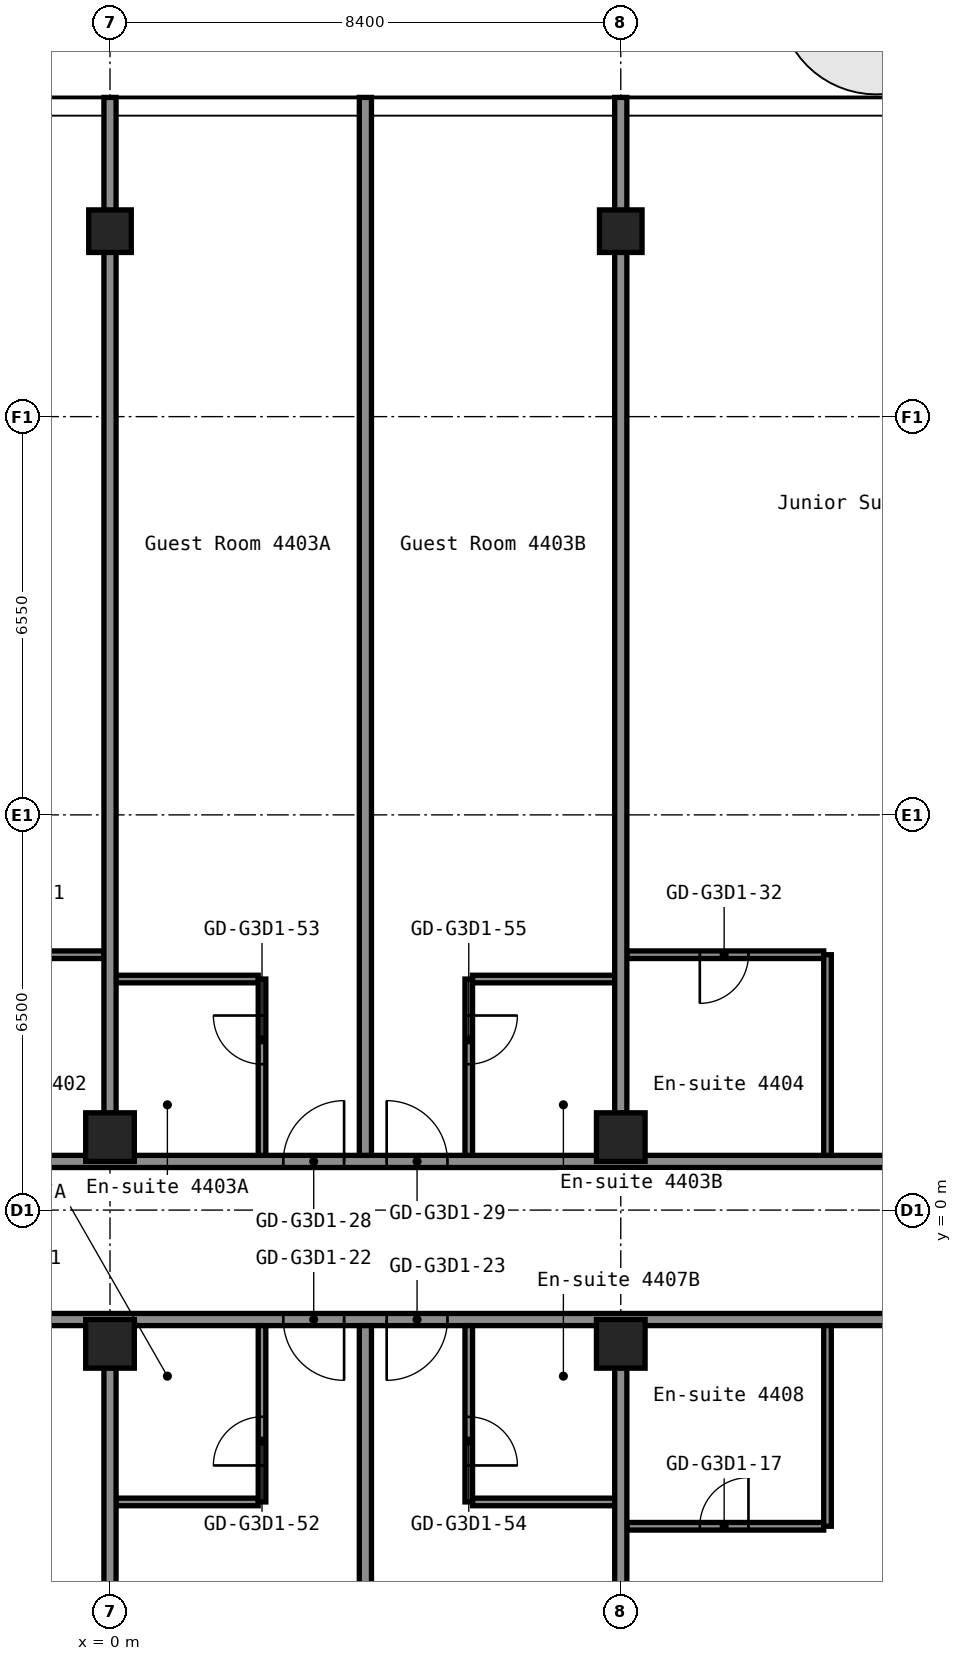
"""IFC4 building model, lengths in metres.
Left out: names, types, materials, properties, quantities, classifications, styles, units other than length and angle.
Written with IfcOpenShell. Run it as: python <this file> out.ifc"""

import sys

from ifc_helpers import new_model, si_unit, direction, frame, frame_2d, origin, origin_2d, place, context, subcontext, project, spatial, rectangle, hollow_rectangle, extrude, element, fill, save


model = new_model("IFC4")
c1 = context("Model", 3, precision=1e-05, world=origin(), true_north=direction((0.0, 1.0)))
c2 = subcontext(c1, "Body", "Model", "MODEL_VIEW")
j1 = project(units=[si_unit("LENGTHUNIT", "METRE"), si_unit("PLANEANGLEUNIT", "RADIAN")], contexts=[c1])
p1 = place(None, origin())
s1 = spatial("IfcSite", under=j1, at=p1, CompositionType="ELEMENT")
p2 = place(p1, origin())
s2 = spatial("IfcBuilding", under=s1, at=p2, CompositionType="ELEMENT")
p3 = place(p2, frame((0.0, 0.0, 156.6)))
s3 = spatial("IfcBuildingStorey", under=s2, at=p3, CompositionType="ELEMENT", Elevation=156.6)
for number, where, z_axis, x_axis in (
    (1, (0.0, -2.2, 0.0), (0.0, 0.0, 1.0), (1.0, 0.0, 0.0)),
    (2, (0.0, 1.2, 0.0), (0.0, 0.0, 1.0), (1.0, 0.0, 0.0)),
):
    element("IfcColumn", number, at=place(p3, frame(where, z_axis=z_axis, x_axis=x_axis)), inside=s3, PredefinedType="COLUMN", context=c2, shape_type="SweptSolid", body=[
        extrude(hollow_rectangle(XDim=0.8, YDim=0.8, WallThickness=0.032, at=origin_2d()), origin(), (0.0, 0.0, 1.0), 2.75),
    ])
p4 = place(p3, frame((0.0, 16.1, 0.0), z_axis=(0.0, 0.0, 1.0), x_axis=(1.0, 0.0, 0.0)))
e3 = element("IfcColumn", 3, at=p4, inside=s3, PredefinedType="COLUMN", context=c2, shape_type="SweptSolid", body=[
    extrude(hollow_rectangle(XDim=0.7, YDim=0.7, WallThickness=0.028, at=origin_2d()), origin(), (0.0, 0.0, 1.0), 2.75),
])
for number, where, z_axis, x_axis in (
    (4, (8.4, -2.2, 0.0), (0.0, 0.0, 1.0), (1.0, 0.0, 0.0)),
    (5, (8.4, 1.2, 0.0), (0.0, 0.0, 1.0), (1.0, 0.0, 0.0)),
):
    element("IfcColumn", number, at=place(p3, frame(where, z_axis=z_axis, x_axis=x_axis)), inside=s3, PredefinedType="COLUMN", context=c2, shape_type="SweptSolid", body=[
        extrude(hollow_rectangle(XDim=0.8, YDim=0.8, WallThickness=0.032, at=origin_2d()), origin(), (0.0, 0.0, 1.0), 2.75),
    ])
p5 = place(p3, frame((8.4, 16.1, 0.0), z_axis=(0.0, 0.0, 1.0), x_axis=(1.0, 0.0, 0.0)))
e6 = element("IfcColumn", 6, at=p5, inside=s3, PredefinedType="COLUMN", context=c2, shape_type="SweptSolid", body=[
    extrude(hollow_rectangle(XDim=0.7, YDim=0.7, WallThickness=0.028, at=origin_2d()), origin(), (0.0, 0.0, 1.0), 2.75),
])
p6 = place(p3, frame((8.5, -5.2, 0.0), z_axis=(0.0, 0.0, 1.0), x_axis=(1.0, 0.0, 0.0)))
e7 = element("IfcWall", 7, at=p6, inside=s3, PredefinedType="PARTITIONING", context=c2, shape_type="SweptSolid", body=[
    extrude(rectangle(XDim=3.238, YDim=0.125, at=frame_2d((1.619, 0.0))), origin(), (0.0, 0.0, 1.0), 2.75),
])
p7 = place(p6, frame((1.2, 0.0, 0.0)))
e8 = element("IfcOpeningElement", 8, at=p7, cuts=e7, PredefinedType="OPENING", context=c2, shape_type="SweptSolid", body=[
    extrude(rectangle(XDim=0.8, YDim=2.1, at=frame_2d((0.4, 1.05))), frame((0.0, 0.073, 0.0), z_axis=(0.0, -1.0, 0.0), x_axis=(1.0, 0.0, 0.0)), (0.0, 0.0, 1.0), 0.145),
])
p8 = place(p3, frame((0.1, -4.8, 0.0), z_axis=(0.0, 0.0, 1.0), x_axis=(1.0, 0.0, 0.0)))
e9 = element("IfcWall", 9, at=p8, inside=s3, PredefinedType="PARTITIONING", context=c2, shape_type="SweptSolid", body=[
    extrude(rectangle(XDim=2.337, YDim=0.125, at=frame_2d((1.169, 0.0))), origin(), (0.0, 0.0, 1.0), 2.75),
])
p9 = place(p3, frame((5.962, -4.8, 0.0), z_axis=(0.0, 0.0, 1.0), x_axis=(1.0, 0.0, 0.0)))
e10 = element("IfcWall", 10, at=p9, inside=s3, PredefinedType="PARTITIONING", context=c2, shape_type="SweptSolid", body=[
    extrude(rectangle(XDim=2.338, YDim=0.125, at=frame_2d((1.169, 0.0))), origin(), (0.0, 0.0, 1.0), 2.75),
])
p10 = place(p3, frame((-16.8, -1.8, 0.0), z_axis=(0.0, 0.0, 1.0), x_axis=(1.0, 0.0, 0.0)))
e11 = element("IfcWall", 11, at=p10, inside=s3, PredefinedType="PARTITIONING", context=c2, shape_type="SweptSolid", body=[
    extrude(rectangle(XDim=33.6, YDim=0.2, at=frame_2d((16.8, 0.0))), origin(), (0.0, 0.0, 1.0), 2.75),
])
p11 = place(p10, frame((2.85, 0.0, 0.0)))
e12 = element("IfcOpeningElement", 12, at=p11, cuts=e11, PredefinedType="OPENING", context=c2, shape_type="SweptSolid", body=[
    extrude(rectangle(XDim=1.0, YDim=2.1, at=frame_2d((0.5, 1.05))), frame((0.0, 0.11, 0.0), z_axis=(0.0, -1.0, 0.0), x_axis=(1.0, 0.0, 0.0)), (0.0, 0.0, 1.0), 0.22),
])
p12 = place(p10, frame((4.55, 0.0, 0.0)))
e13 = element("IfcOpeningElement", 13, at=p12, cuts=e11, PredefinedType="OPENING", context=c2, shape_type="SweptSolid", body=[
    extrude(rectangle(XDim=1.0, YDim=2.1, at=frame_2d((0.5, 1.05))), frame((0.0, 0.11, 0.0), z_axis=(0.0, -1.0, 0.0), x_axis=(1.0, 0.0, 0.0)), (0.0, 0.0, 1.0), 0.22),
])
p13 = place(p10, frame((10.385, 0.0, 0.0)))
e14 = element("IfcOpeningElement", 14, at=p13, cuts=e11, PredefinedType="OPENING", context=c2, shape_type="SweptSolid", body=[
    extrude(rectangle(XDim=0.9, YDim=2.1, at=frame_2d((0.45, 1.05))), frame((0.0, 0.11, 0.0), z_axis=(0.0, -1.0, 0.0), x_axis=(1.0, 0.0, 0.0)), (0.0, 0.0, 1.0), 0.22),
])
p14 = place(p10, frame((14.585, 0.0, 0.0)))
e15 = element("IfcOpeningElement", 15, at=p14, cuts=e11, PredefinedType="OPENING", context=c2, shape_type="SweptSolid", body=[
    extrude(rectangle(XDim=0.9, YDim=2.1, at=frame_2d((0.45, 1.05))), frame((0.0, 0.11, 0.0), z_axis=(0.0, -1.0, 0.0), x_axis=(1.0, 0.0, 0.0)), (0.0, 0.0, 1.0), 0.22),
])
p15 = place(p10, frame((19.65, 0.0, 0.0)))
e16 = element("IfcOpeningElement", 16, at=p15, cuts=e11, PredefinedType="OPENING", context=c2, shape_type="SweptSolid", body=[
    extrude(rectangle(XDim=1.0, YDim=2.1, at=frame_2d((0.5, 1.05))), frame((0.0, 0.11, 0.0), z_axis=(0.0, -1.0, 0.0), x_axis=(1.0, 0.0, 0.0)), (0.0, 0.0, 1.0), 0.22),
])
p16 = place(p10, frame((21.35, 0.0, 0.0)))
e17 = element("IfcOpeningElement", 17, at=p16, cuts=e11, PredefinedType="OPENING", context=c2, shape_type="SweptSolid", body=[
    extrude(rectangle(XDim=1.0, YDim=2.1, at=frame_2d((0.5, 1.05))), frame((0.0, 0.11, 0.0), z_axis=(0.0, -1.0, 0.0), x_axis=(1.0, 0.0, 0.0)), (0.0, 0.0, 1.0), 0.22),
])
p17 = place(p10, frame((30.6, 0.0, 0.0)))
e18 = element("IfcOpeningElement", 18, at=p17, cuts=e11, PredefinedType="OPENING", context=c2, shape_type="SweptSolid", body=[
    extrude(rectangle(XDim=1.0, YDim=2.1, at=frame_2d((0.5, 1.05))), frame((0.0, 0.11, 0.0), z_axis=(0.0, -1.0, 0.0), x_axis=(1.0, 0.0, 0.0)), (0.0, 0.0, 1.0), 0.22),
])
p18 = place(p3, frame((-16.8, 0.8, 0.0), z_axis=(0.0, 0.0, 1.0), x_axis=(1.0, 0.0, 0.0)))
e19 = element("IfcWall", 19, at=p18, inside=s3, PredefinedType="PARTITIONING", context=c2, shape_type="SweptSolid", body=[
    extrude(rectangle(XDim=33.6, YDim=0.2, at=frame_2d((16.8, 0.0))), origin(), (0.0, 0.0, 1.0), 2.75),
])
p19 = place(p18, frame((2.85, 0.0, 0.0)))
e20 = element("IfcOpeningElement", 20, at=p19, cuts=e19, PredefinedType="OPENING", context=c2, shape_type="SweptSolid", body=[
    extrude(rectangle(XDim=1.0, YDim=2.1, at=frame_2d((0.5, 1.05))), frame((0.0, 0.11, 0.0), z_axis=(0.0, -1.0, 0.0), x_axis=(1.0, 0.0, 0.0)), (0.0, 0.0, 1.0), 0.22),
])
p20 = place(p18, frame((4.55, 0.0, 0.0)))
e21 = element("IfcOpeningElement", 21, at=p20, cuts=e19, PredefinedType="OPENING", context=c2, shape_type="SweptSolid", body=[
    extrude(rectangle(XDim=1.0, YDim=2.1, at=frame_2d((0.5, 1.05))), frame((0.0, 0.11, 0.0), z_axis=(0.0, -1.0, 0.0), x_axis=(1.0, 0.0, 0.0)), (0.0, 0.0, 1.0), 0.22),
])
p21 = place(p18, frame((10.4, 0.0, 0.0)))
e22 = element("IfcOpeningElement", 22, at=p21, cuts=e19, PredefinedType="OPENING", context=c2, shape_type="SweptSolid", body=[
    extrude(rectangle(XDim=1.0, YDim=2.1, at=frame_2d((0.5, 1.05))), frame((0.0, 0.11, 0.0), z_axis=(0.0, -1.0, 0.0), x_axis=(1.0, 0.0, 0.0)), (0.0, 0.0, 1.0), 0.22),
])
p22 = place(p18, frame((19.65, 0.0, 0.0)))
e23 = element("IfcOpeningElement", 23, at=p22, cuts=e19, PredefinedType="OPENING", context=c2, shape_type="SweptSolid", body=[
    extrude(rectangle(XDim=1.0, YDim=2.1, at=frame_2d((0.5, 1.05))), frame((0.0, 0.11, 0.0), z_axis=(0.0, -1.0, 0.0), x_axis=(1.0, 0.0, 0.0)), (0.0, 0.0, 1.0), 0.22),
])
p23 = place(p18, frame((21.35, 0.0, 0.0)))
e24 = element("IfcOpeningElement", 24, at=p23, cuts=e19, PredefinedType="OPENING", context=c2, shape_type="SweptSolid", body=[
    extrude(rectangle(XDim=1.0, YDim=2.1, at=frame_2d((0.5, 1.05))), frame((0.0, 0.11, 0.0), z_axis=(0.0, -1.0, 0.0), x_axis=(1.0, 0.0, 0.0)), (0.0, 0.0, 1.0), 0.22),
])
p24 = place(p18, frame((30.6, 0.0, 0.0)))
e25 = element("IfcOpeningElement", 25, at=p24, cuts=e19, PredefinedType="OPENING", context=c2, shape_type="SweptSolid", body=[
    extrude(rectangle(XDim=1.0, YDim=2.1, at=frame_2d((0.5, 1.05))), frame((0.0, 0.11, 0.0), z_axis=(0.0, -1.0, 0.0), x_axis=(1.0, 0.0, 0.0)), (0.0, 0.0, 1.0), 0.22),
])
p25 = place(p3, frame((0.1, 3.8, 0.0), z_axis=(0.0, 0.0, 1.0), x_axis=(1.0, 0.0, 0.0)))
e26 = element("IfcWall", 26, at=p25, inside=s3, PredefinedType="PARTITIONING", context=c2, shape_type="SweptSolid", body=[
    extrude(rectangle(XDim=2.337, YDim=0.125, at=frame_2d((1.169, 0.0))), origin(), (0.0, 0.0, 1.0), 2.75),
])
p26 = place(p3, frame((5.962, 3.8, 0.0), z_axis=(0.0, 0.0, 1.0), x_axis=(1.0, 0.0, 0.0)))
e27 = element("IfcWall", 27, at=p26, inside=s3, PredefinedType="PARTITIONING", context=c2, shape_type="SweptSolid", body=[
    extrude(rectangle(XDim=2.338, YDim=0.125, at=frame_2d((1.169, 0.0))), origin(), (0.0, 0.0, 1.0), 2.75),
])
p27 = place(p3, frame((-3.337, 4.2, 0.0), z_axis=(0.0, 0.0, 1.0), x_axis=(1.0, 0.0, 0.0)))
e28 = element("IfcWall", 28, at=p27, inside=s3, PredefinedType="PARTITIONING", context=c2, shape_type="SweptSolid", body=[
    extrude(rectangle(XDim=3.237, YDim=0.125, at=frame_2d((1.619, 0.0))), origin(), (0.0, 0.0, 1.0), 2.75),
])
p28 = place(p27, frame((1.238, 0.0, 0.0)))
e29 = element("IfcOpeningElement", 29, at=p28, cuts=e28, PredefinedType="OPENING", context=c2, shape_type="SweptSolid", body=[
    extrude(rectangle(XDim=0.8, YDim=2.1, at=frame_2d((0.4, 1.05))), frame((0.0, 0.073, 0.0), z_axis=(0.0, -1.0, 0.0), x_axis=(1.0, 0.0, 0.0)), (0.0, 0.0, 1.0), 0.145),
])
p29 = place(p3, frame((8.5, 4.2, 0.0), z_axis=(0.0, 0.0, 1.0), x_axis=(1.0, 0.0, 0.0)))
e30 = element("IfcWall", 30, at=p29, inside=s3, PredefinedType="PARTITIONING", context=c2, shape_type="SweptSolid", body=[
    extrude(rectangle(XDim=3.238, YDim=0.125, at=frame_2d((1.619, 0.0))), origin(), (0.0, 0.0, 1.0), 2.75),
])
p30 = place(p29, frame((1.2, 0.0, 0.0)))
e31 = element("IfcOpeningElement", 31, at=p30, cuts=e30, PredefinedType="OPENING", context=c2, shape_type="SweptSolid", body=[
    extrude(rectangle(XDim=0.8, YDim=2.1, at=frame_2d((0.4, 1.05))), frame((0.0, 0.073, 0.0), z_axis=(0.0, -1.0, 0.0), x_axis=(1.0, 0.0, 0.0)), (0.0, 0.0, 1.0), 0.145),
])
for number, where, z_axis, x_axis in (
    (32, (0.0, -19.3, 0.0), (0.0, 0.0, 1.0), (0.0, 1.0, 0.0)),
    (33, (0.0, 1.59, 0.0), (0.0, 0.0, 1.0), (0.0, 1.0, 0.0)),
):
    element("IfcWall", number, at=place(p3, frame(where, z_axis=z_axis, x_axis=x_axis)), inside=s3, PredefinedType="PARTITIONING", context=c2, shape_type="SweptSolid", body=[
        extrude(rectangle(XDim=16.71, YDim=0.2, at=frame_2d((8.355, 0.0))), origin(), (0.0, 0.0, 1.0), 2.75),
    ])
p31 = place(p3, frame((2.5, -4.8, 0.0), z_axis=(0.0, 0.0, 1.0), x_axis=(0.0, 1.0, 0.0)))
e34 = element("IfcWall", 34, at=p31, inside=s3, PredefinedType="PARTITIONING", context=c2, shape_type="SweptSolid", body=[
    extrude(rectangle(XDim=2.9, YDim=0.125, at=frame_2d((1.45, 0.0))), origin(), (0.0, 0.0, 1.0), 2.75),
])
p32 = place(p31, frame((0.6, 0.0, 0.0)))
e35 = element("IfcOpeningElement", 35, at=p32, cuts=e34, PredefinedType="OPENING", context=c2, shape_type="SweptSolid", body=[
    extrude(rectangle(XDim=0.8, YDim=2.1, at=frame_2d((0.4, 1.05))), frame((0.0, 0.073, 0.0), z_axis=(0.0, -1.0, 0.0), x_axis=(1.0, 0.0, 0.0)), (0.0, 0.0, 1.0), 0.145),
])
p33 = place(p3, frame((2.5, 0.9, 0.0), z_axis=(0.0, 0.0, 1.0), x_axis=(0.0, 1.0, 0.0)))
e36 = element("IfcWall", 36, at=p33, inside=s3, PredefinedType="PARTITIONING", context=c2, shape_type="SweptSolid", body=[
    extrude(rectangle(XDim=2.9, YDim=0.125, at=frame_2d((1.45, 0.0))), origin(), (0.0, 0.0, 1.0), 2.75),
])
p34 = place(p33, frame((1.5, 0.0, 0.0)))
e37 = element("IfcOpeningElement", 37, at=p34, cuts=e36, PredefinedType="OPENING", context=c2, shape_type="SweptSolid", body=[
    extrude(rectangle(XDim=0.8, YDim=2.1, at=frame_2d((0.4, 1.05))), frame((0.0, 0.073, 0.0), z_axis=(0.0, -1.0, 0.0), x_axis=(1.0, 0.0, 0.0)), (0.0, 0.0, 1.0), 0.145),
])
for number, where, z_axis, x_axis in (
    (38, (4.2, -19.3, 0.0), (0.0, 0.0, 1.0), (0.0, 1.0, 0.0)),
    (39, (4.2, 0.9, 0.0), (0.0, 0.0, 1.0), (0.0, 1.0, 0.0)),
):
    element("IfcWall", number, at=place(p3, frame(where, z_axis=z_axis, x_axis=x_axis)), inside=s3, PredefinedType="PARTITIONING", context=c2, shape_type="SweptSolid", body=[
        extrude(rectangle(XDim=17.4, YDim=0.2, at=frame_2d((8.7, 0.0))), origin(), (0.0, 0.0, 1.0), 2.75),
    ])
p35 = place(p3, frame((5.9, -4.8, 0.0), z_axis=(0.0, 0.0, 1.0), x_axis=(0.0, 1.0, 0.0)))
e40 = element("IfcWall", 40, at=p35, inside=s3, PredefinedType="PARTITIONING", context=c2, shape_type="SweptSolid", body=[
    extrude(rectangle(XDim=2.9, YDim=0.125, at=frame_2d((1.45, 0.0))), origin(), (0.0, 0.0, 1.0), 2.75),
])
p36 = place(p35, frame((0.6, 0.0, 0.0)))
e41 = element("IfcOpeningElement", 41, at=p36, cuts=e40, PredefinedType="OPENING", context=c2, shape_type="SweptSolid", body=[
    extrude(rectangle(XDim=0.8, YDim=2.1, at=frame_2d((0.4, 1.05))), frame((0.0, 0.073, 0.0), z_axis=(0.0, -1.0, 0.0), x_axis=(1.0, 0.0, 0.0)), (0.0, 0.0, 1.0), 0.145),
])
p37 = place(p3, frame((5.9, 0.9, 0.0), z_axis=(0.0, 0.0, 1.0), x_axis=(0.0, 1.0, 0.0)))
e42 = element("IfcWall", 42, at=p37, inside=s3, PredefinedType="PARTITIONING", context=c2, shape_type="SweptSolid", body=[
    extrude(rectangle(XDim=2.9, YDim=0.125, at=frame_2d((1.45, 0.0))), origin(), (0.0, 0.0, 1.0), 2.75),
])
p38 = place(p37, frame((1.5, 0.0, 0.0)))
e43 = element("IfcOpeningElement", 43, at=p38, cuts=e42, PredefinedType="OPENING", context=c2, shape_type="SweptSolid", body=[
    extrude(rectangle(XDim=0.8, YDim=2.1, at=frame_2d((0.4, 1.05))), frame((0.0, 0.073, 0.0), z_axis=(0.0, -1.0, 0.0), x_axis=(1.0, 0.0, 0.0)), (0.0, 0.0, 1.0), 0.145),
])
for number, where, z_axis, x_axis in (
    (44, (8.4, -19.3, 0.0), (0.0, 0.0, 1.0), (0.0, 1.0, 0.0)),
    (45, (8.4, 1.59, 0.0), (0.0, 0.0, 1.0), (0.0, 1.0, 0.0)),
):
    element("IfcWall", number, at=place(p3, frame(where, z_axis=z_axis, x_axis=x_axis)), inside=s3, PredefinedType="PARTITIONING", context=c2, shape_type="SweptSolid", body=[
        extrude(rectangle(XDim=16.71, YDim=0.2, at=frame_2d((8.355, 0.0))), origin(), (0.0, 0.0, 1.0), 2.75),
    ])
for number, where, z_axis, x_axis in (
    (46, (11.8, -5.2, 0.0), (0.0, 0.0, 1.0), (0.0, 1.0, 0.0)),
    (47, (11.8, 0.9, 0.0), (0.0, 0.0, 1.0), (0.0, 1.0, 0.0)),
):
    element("IfcWall", number, at=place(p3, frame(where, z_axis=z_axis, x_axis=x_axis)), inside=s3, PredefinedType="PARTITIONING", context=c2, shape_type="SweptSolid", body=[
        extrude(rectangle(XDim=3.3, YDim=0.125, at=frame_2d((1.65, 0.0))), origin(), (0.0, 0.0, 1.0), 2.75),
    ])
p39 = place(p7, origin())
e48 = element("IfcDoor", 48, at=p39, inside=s3, OperationType="SINGLE_SWING_LEFT", PredefinedType="DOOR", context=c2, shape_type="SweptSolid", body=[
    extrude(rectangle(XDim=0.8, YDim=2.1, at=frame_2d((0.4, 1.05))), frame((0.0, 0.025, 0.0), z_axis=(0.0, -1.0, 0.0), x_axis=(1.0, 0.0, 0.0)), (0.0, 0.0, 1.0), 0.05),
])
fill(e8, e48)
p40 = place(p15, origin())
e49 = element("IfcDoor", 49, at=p40, inside=s3, OperationType="SINGLE_SWING_RIGHT", PredefinedType="DOOR", context=c2, shape_type="SweptSolid", body=[
    extrude(rectangle(XDim=1.0, YDim=2.1, at=frame_2d((0.5, 1.05))), frame((0.0, 0.025, 0.0), z_axis=(0.0, -1.0, 0.0), x_axis=(1.0, 0.0, 0.0)), (0.0, 0.0, 1.0), 0.05),
])
fill(e16, e49)
p41 = place(p16, origin())
e50 = element("IfcDoor", 50, at=p41, inside=s3, OperationType="SINGLE_SWING_LEFT", PredefinedType="DOOR", context=c2, shape_type="SweptSolid", body=[
    extrude(rectangle(XDim=1.0, YDim=2.1, at=frame_2d((0.5, 1.05))), frame((0.0, 0.025, 0.0), z_axis=(0.0, -1.0, 0.0), x_axis=(1.0, 0.0, 0.0)), (0.0, 0.0, 1.0), 0.05),
])
fill(e17, e50)
p42 = place(p22, origin())
e51 = element("IfcDoor", 51, at=p42, inside=s3, OperationType="SINGLE_SWING_LEFT", PredefinedType="DOOR", context=c2, shape_type="SweptSolid", body=[
    extrude(rectangle(XDim=1.0, YDim=2.1, at=frame_2d((0.5, 1.05))), frame((0.0, 0.025, 0.0), z_axis=(0.0, -1.0, 0.0), x_axis=(1.0, 0.0, 0.0)), (0.0, 0.0, 1.0), 0.05),
])
fill(e23, e51)
p43 = place(p23, origin())
e52 = element("IfcDoor", 52, at=p43, inside=s3, OperationType="SINGLE_SWING_RIGHT", PredefinedType="DOOR", context=c2, shape_type="SweptSolid", body=[
    extrude(rectangle(XDim=1.0, YDim=2.1, at=frame_2d((0.5, 1.05))), frame((0.0, 0.025, 0.0), z_axis=(0.0, -1.0, 0.0), x_axis=(1.0, 0.0, 0.0)), (0.0, 0.0, 1.0), 0.05),
])
fill(e24, e52)
p44 = place(p30, origin())
e53 = element("IfcDoor", 53, at=p44, inside=s3, OperationType="SINGLE_SWING_LEFT", PredefinedType="DOOR", context=c2, shape_type="SweptSolid", body=[
    extrude(rectangle(XDim=0.8, YDim=2.1, at=frame_2d((0.4, 1.05))), frame((0.0, 0.025, 0.0), z_axis=(0.0, -1.0, 0.0), x_axis=(1.0, 0.0, 0.0)), (0.0, 0.0, 1.0), 0.05),
])
fill(e31, e53)
p45 = place(p32, origin())
e54 = element("IfcDoor", 54, at=p45, inside=s3, OperationType="SINGLE_SWING_RIGHT", PredefinedType="DOOR", context=c2, shape_type="SweptSolid", body=[
    extrude(rectangle(XDim=0.8, YDim=2.1, at=frame_2d((0.4, 1.05))), frame((0.0, 0.025, 0.0), z_axis=(0.0, -1.0, 0.0), x_axis=(1.0, 0.0, 0.0)), (0.0, 0.0, 1.0), 0.05),
])
fill(e35, e54)
p46 = place(p34, origin())
e55 = element("IfcDoor", 55, at=p46, inside=s3, OperationType="SINGLE_SWING_LEFT", PredefinedType="DOOR", context=c2, shape_type="SweptSolid", body=[
    extrude(rectangle(XDim=0.8, YDim=2.1, at=frame_2d((0.4, 1.05))), frame((0.0, 0.025, 0.0), z_axis=(0.0, -1.0, 0.0), x_axis=(1.0, 0.0, 0.0)), (0.0, 0.0, 1.0), 0.05),
])
fill(e37, e55)
p47 = place(p36, origin())
e56 = element("IfcDoor", 56, at=p47, inside=s3, OperationType="SINGLE_SWING_LEFT", PredefinedType="DOOR", context=c2, shape_type="SweptSolid", body=[
    extrude(rectangle(XDim=0.8, YDim=2.1, at=frame_2d((0.4, 1.05))), frame((0.0, 0.025, 0.0), z_axis=(0.0, -1.0, 0.0), x_axis=(1.0, 0.0, 0.0)), (0.0, 0.0, 1.0), 0.05),
])
fill(e41, e56)
p48 = place(p38, origin())
e57 = element("IfcDoor", 57, at=p48, inside=s3, OperationType="SINGLE_SWING_RIGHT", PredefinedType="DOOR", context=c2, shape_type="SweptSolid", body=[
    extrude(rectangle(XDim=0.8, YDim=2.1, at=frame_2d((0.4, 1.05))), frame((0.0, 0.025, 0.0), z_axis=(0.0, -1.0, 0.0), x_axis=(1.0, 0.0, 0.0)), (0.0, 0.0, 1.0), 0.05),
])
fill(e43, e57)
save(model, sys.argv[1])
